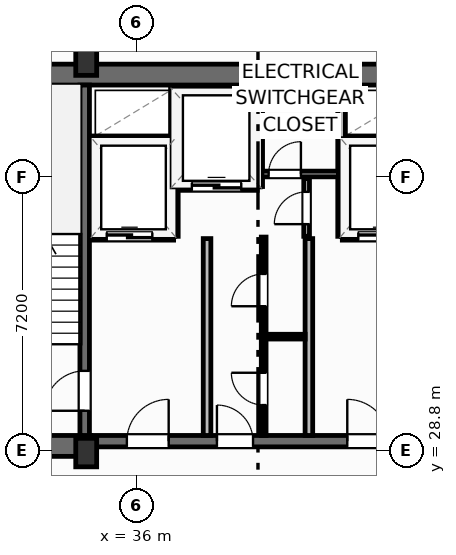
"""IFC4 building model, lengths in metres.
Left out: names, types, materials, properties, quantities, classifications, styles, units other than length and angle.
Written with IfcOpenShell. Run it as: python <this file> out.ifc"""

import sys

from ifc_helpers import new_model, si_unit, direction, frame, frame_2d, origin, origin_2d, place, context, subcontext, project, spatial, rectangle, extrude, element, fill, save


model = new_model("IFC4")
c1 = context("Model", 3, precision=1e-05, world=origin(), true_north=direction((0.0, 1.0)))
c2 = subcontext(c1, "Body", "Model", "MODEL_VIEW")
j1 = project(units=[si_unit("LENGTHUNIT", "METRE"), si_unit("PLANEANGLEUNIT", "RADIAN")], contexts=[c1])
p1 = place(None, origin())
s1 = spatial("IfcSite", under=j1, at=p1, CompositionType="ELEMENT")
p2 = place(p1, origin())
s2 = spatial("IfcBuilding", under=s1, at=p2, CompositionType="ELEMENT")
p3 = place(p2, frame((0.0, 0.0, 276.7)))
s3 = spatial("IfcBuildingStorey", under=s2, at=p3, CompositionType="ELEMENT", Elevation=276.7)
for number, where, z_axis, x_axis in (
    (1, (34.68, 28.75, 0.0), (0.0, 0.0, 1.0), (1.0, 0.0, 0.0)),
    (2, (34.68, 39.05, 0.0), (0.0, 0.0, 1.0), (1.0, 0.0, 0.0)),
):
    element("IfcColumn", number, at=place(p3, frame(where, z_axis=z_axis, x_axis=x_axis)), inside=s3, PredefinedType="COLUMN", context=c2, shape_type="SweptSolid", body=[
        extrude(rectangle(XDim=0.55, YDim=0.75, at=origin_2d()), origin(), (0.0, 0.0, 1.0), 3.7),
    ])
p4 = place(p3, frame((30.58, 38.695, 0.0), z_axis=(0.0, 0.0, 1.0), x_axis=(1.0, 0.0, 0.0)))
e3 = element("IfcWall", 3, at=p4, inside=s3, PredefinedType="SHEAR", context=c2, shape_type="SweptSolid", body=[
    extrude(rectangle(XDim=17.24, YDim=0.55, at=frame_2d((8.62, 0.0))), origin(), (0.0, 0.0, 1.0), 3.45),
])
p5 = place(p3, frame((30.58, 28.925, 0.0), z_axis=(0.0, 0.0, 1.0), x_axis=(1.0, 0.0, 0.0)))
e4 = element("IfcWall", 4, at=p5, inside=s3, PredefinedType="SHEAR", context=c2, shape_type="SweptSolid", body=[
    extrude(rectangle(XDim=4.22, YDim=0.55, at=frame_2d((2.11, 0.0))), origin(), (0.0, 0.0, 1.0), 3.45),
])
p6 = place(p3, frame((34.8, 29.05, 0.0), z_axis=(0.0, 0.0, 1.0), x_axis=(1.0, 0.0, 0.0)))
e5 = element("IfcWall", 5, at=p6, inside=s3, PredefinedType="SHEAR", context=c2, shape_type="SweptSolid", body=[
    extrude(rectangle(XDim=8.8, YDim=0.3, at=frame_2d((4.4, 0.0))), origin(), (0.0, 0.0, 1.0), 3.45),
])
p7 = place(p6, frame((0.95, 0.0, 0.0)))
e6 = element("IfcOpeningElement", 6, at=p7, cuts=e5, PredefinedType="OPENING", context=c2, shape_type="SweptSolid", body=[
    extrude(rectangle(XDim=1.1, YDim=2.15, at=frame_2d((0.55, 1.075))), frame((0.0, 0.16, 0.0), z_axis=(0.0, -1.0, 0.0), x_axis=(1.0, 0.0, 0.0)), (0.0, 0.0, 1.0), 0.32),
])
p8 = place(p6, frame((6.75, 0.0, 0.0)))
e7 = element("IfcOpeningElement", 7, at=p8, cuts=e5, PredefinedType="OPENING", context=c2, shape_type="SweptSolid", body=[
    extrude(rectangle(XDim=1.1, YDim=2.15, at=frame_2d((0.55, 1.075))), frame((0.0, 0.16, 0.0), z_axis=(0.0, -1.0, 0.0), x_axis=(1.0, 0.0, 0.0)), (0.0, 0.0, 1.0), 0.32),
])
p9 = place(p6, frame((3.32, 0.0, 0.0)))
e8 = element("IfcOpeningElement", 8, at=p9, cuts=e5, PredefinedType="OPENING", context=c2, shape_type="SweptSolid", body=[
    extrude(rectangle(XDim=0.95, YDim=2.15, at=frame_2d((0.475, 1.075))), frame((0.0, 0.16, 0.0), z_axis=(0.0, -1.0, 0.0), x_axis=(1.0, 0.0, 0.0)), (0.0, 0.0, 1.0), 0.32),
])
p10 = place(p3, frame((34.64, 29.2, 0.0), z_axis=(0.0, 0.0, 1.0), x_axis=(0.0, 1.0, 0.0)))
e9 = element("IfcWall", 9, at=p10, inside=s3, PredefinedType="SHEAR", context=c2, shape_type="SweptSolid", body=[
    extrude(rectangle(XDim=9.22, YDim=0.25, at=frame_2d((4.61, 0.0))), origin(), (0.0, 0.0, 1.0), 3.45),
])
p11 = place(p10, frame((0.65, 0.0, 0.0)))
e10 = element("IfcOpeningElement", 10, at=p11, cuts=e9, PredefinedType="OPENING", context=c2, shape_type="SweptSolid", body=[
    extrude(rectangle(XDim=1.05, YDim=2.15, at=frame_2d((0.525, 1.075))), frame((0.0, 0.135, 0.0), z_axis=(0.0, -1.0, 0.0), x_axis=(1.0, 0.0, 0.0)), (0.0, 0.0, 1.0), 0.27),
])
for number, where, z_axis, x_axis in (
    (11, (37.86, 29.2, 0.0), (0.0, 0.0, 1.0), (0.0, 1.0, 0.0)),
    (12, (40.54, 29.2, 0.0), (0.0, 0.0, 1.0), (0.0, 1.0, 0.0)),
):
    element("IfcWall", number, at=place(p3, frame(where, z_axis=z_axis, x_axis=x_axis)), inside=s3, PredefinedType="PARTITIONING", context=c2, shape_type="SweptSolid", body=[
        extrude(rectangle(XDim=5.18, YDim=0.2, at=frame_2d((2.59, 0.0))), origin(), (0.0, 0.0, 1.0), 3.45),
    ])
p12 = place(p3, frame((34.8, 34.44, 0.0), z_axis=(0.0, 0.0, 1.0), x_axis=(1.0, 0.0, 0.0)))
e13 = element("IfcWall", 13, at=p12, inside=s3, PredefinedType="PARTITIONING", context=c2, shape_type="SweptSolid", body=[
    extrude(rectangle(XDim=2.18, YDim=0.2, at=frame_2d((1.09, 0.0))), origin(), (0.0, 0.0, 1.0), 3.45),
])
p13 = place(p12, frame((0.42, 0.0, 0.0)))
e14 = element("IfcOpeningElement", 14, at=p13, cuts=e13, PredefinedType="OPENING", context=c2, shape_type="SweptSolid", body=[
    extrude(rectangle(XDim=1.2, YDim=2.2, at=frame_2d((0.6, 1.1))), frame((0.0, 0.11, 0.0), z_axis=(0.0, -1.0, 0.0), x_axis=(1.0, 0.0, 0.0)), (0.0, 0.0, 1.0), 0.22),
])
p14 = place(p3, frame((34.8, 36.98, 0.0), z_axis=(0.0, 0.0, 1.0), x_axis=(1.0, 0.0, 0.0)))
e15 = element("IfcWall", 15, at=p14, inside=s3, PredefinedType="PARTITIONING", context=c2, shape_type="SweptSolid", body=[
    extrude(rectangle(XDim=2.18, YDim=0.2, at=frame_2d((1.09, 0.0))), origin(), (0.0, 0.0, 1.0), 3.45),
])
p15 = place(p3, frame((37.0, 34.44, 0.0), z_axis=(0.0, 0.0, 1.0), x_axis=(0.0, 1.0, 0.0)))
e16 = element("IfcWall", 16, at=p15, inside=s3, PredefinedType="PARTITIONING", context=c2, shape_type="SweptSolid", body=[
    extrude(rectangle(XDim=3.9, YDim=0.2, at=frame_2d((1.95, 0.0))), origin(), (0.0, 0.0, 1.0), 3.45),
])
p16 = place(p3, frame((41.42, 34.44, 0.0), z_axis=(0.0, 0.0, 1.0), x_axis=(1.0, 0.0, 0.0)))
e17 = element("IfcWall", 17, at=p16, inside=s3, PredefinedType="PARTITIONING", context=c2, shape_type="SweptSolid", body=[
    extrude(rectangle(XDim=2.18, YDim=0.2, at=frame_2d((1.09, 0.0))), origin(), (0.0, 0.0, 1.0), 3.45),
])
p17 = place(p16, frame((0.42, 0.0, 0.0)))
e18 = element("IfcOpeningElement", 18, at=p17, cuts=e17, PredefinedType="OPENING", context=c2, shape_type="SweptSolid", body=[
    extrude(rectangle(XDim=1.2, YDim=2.2, at=frame_2d((0.6, 1.1))), frame((0.0, 0.11, 0.0), z_axis=(0.0, -1.0, 0.0), x_axis=(1.0, 0.0, 0.0)), (0.0, 0.0, 1.0), 0.22),
])
p18 = place(p3, frame((41.42, 36.98, 0.0), z_axis=(0.0, 0.0, 1.0), x_axis=(1.0, 0.0, 0.0)))
e19 = element("IfcWall", 19, at=p18, inside=s3, PredefinedType="PARTITIONING", context=c2, shape_type="SweptSolid", body=[
    extrude(rectangle(XDim=2.18, YDim=0.2, at=frame_2d((1.09, 0.0))), origin(), (0.0, 0.0, 1.0), 3.45),
])
p19 = place(p3, frame((41.4, 34.44, 0.0), z_axis=(0.0, 0.0, 1.0), x_axis=(0.0, 1.0, 0.0)))
e20 = element("IfcWall", 20, at=p19, inside=s3, PredefinedType="PARTITIONING", context=c2, shape_type="SweptSolid", body=[
    extrude(rectangle(XDim=3.9, YDim=0.2, at=frame_2d((1.95, 0.0))), origin(), (0.0, 0.0, 1.0), 3.45),
])
p20 = place(p3, frame((37.06, 35.75, 0.0), z_axis=(0.0, 0.0, 1.0), x_axis=(1.0, 0.0, 0.0)))
e21 = element("IfcWall", 21, at=p20, inside=s3, PredefinedType="PARTITIONING", context=c2, shape_type="SweptSolid", body=[
    extrude(rectangle(XDim=2.12, YDim=0.2, at=frame_2d((1.06, 0.0))), origin(), (0.0, 0.0, 1.0), 3.45),
])
p21 = place(p20, frame((0.4, 0.0, 0.0)))
e22 = element("IfcOpeningElement", 22, at=p21, cuts=e21, PredefinedType="OPENING", context=c2, shape_type="SweptSolid", body=[
    extrude(rectangle(XDim=1.3, YDim=2.2, at=frame_2d((0.65, 1.1))), frame((0.0, 0.11, 0.0), z_axis=(0.0, -1.0, 0.0), x_axis=(1.0, 0.0, 0.0)), (0.0, 0.0, 1.0), 0.22),
])
p22 = place(p3, frame((39.22, 35.75, 0.0), z_axis=(0.0, 0.0, 1.0), x_axis=(0.0, 1.0, 0.0)))
e23 = element("IfcWall", 23, at=p22, inside=s3, PredefinedType="PARTITIONING", context=c2, shape_type="SweptSolid", body=[
    extrude(rectangle(XDim=2.59, YDim=0.2, at=frame_2d((1.295, 0.0))), origin(), (0.0, 0.0, 1.0), 3.45),
])
p23 = place(p3, frame((39.3, 36.08, 0.0), z_axis=(0.0, 0.0, 1.0), x_axis=(1.0, 0.0, 0.0)))
e24 = element("IfcWall", 24, at=p23, inside=s3, PredefinedType="PARTITIONING", context=c2, shape_type="SweptSolid", body=[
    extrude(rectangle(XDim=2.02, YDim=0.15, at=frame_2d((1.01, 0.0))), origin(), (0.0, 0.0, 1.0), 3.45),
])
p24 = place(p23, frame((0.18, 0.0, 0.0)))
e25 = element("IfcOpeningElement", 25, at=p24, cuts=e24, PredefinedType="OPENING", context=c2, shape_type="SweptSolid", body=[
    extrude(rectangle(XDim=0.85, YDim=2.05, at=frame_2d((0.425, 1.025))), frame((0.0, 0.085, 0.0), z_axis=(0.0, -1.0, 0.0), x_axis=(1.0, 0.0, 0.0)), (0.0, 0.0, 1.0), 0.17),
])
p25 = place(p3, frame((40.48, 34.44, 0.0), z_axis=(0.0, 0.0, 1.0), x_axis=(0.0, 1.0, 0.0)))
e26 = element("IfcWall", 26, at=p25, inside=s3, PredefinedType="PARTITIONING", context=c2, shape_type="SweptSolid", body=[
    extrude(rectangle(XDim=1.52, YDim=0.15, at=frame_2d((0.76, 0.0))), origin(), (0.0, 0.0, 1.0), 3.45),
])
p26 = place(p25, frame((0.32, 0.0, 0.0)))
e27 = element("IfcOpeningElement", 27, at=p26, cuts=e26, PredefinedType="OPENING", context=c2, shape_type="SweptSolid", body=[
    extrude(rectangle(XDim=0.85, YDim=2.05, at=frame_2d((0.425, 1.025))), frame((0.0, 0.085, 0.0), z_axis=(0.0, -1.0, 0.0), x_axis=(1.0, 0.0, 0.0)), (0.0, 0.0, 1.0), 0.17),
])
p27 = place(p3, frame((39.35, 31.8, 0.0), z_axis=(0.0, 0.0, 1.0), x_axis=(1.0, 0.0, 0.0)))
e28 = element("IfcWall", 28, at=p27, inside=s3, PredefinedType="PARTITIONING", context=c2, shape_type="SweptSolid", body=[
    extrude(rectangle(XDim=1.09, YDim=0.125, at=frame_2d((0.545, 0.0))), origin(), (0.0, 0.0, 1.0), 3.45),
])
p28 = place(p3, frame((39.35, 29.2, 0.0), z_axis=(0.0, 0.0, 1.0), x_axis=(0.0, 1.0, 0.0)))
e29 = element("IfcWall", 29, at=p28, inside=s3, PredefinedType="PARTITIONING", context=c2, shape_type="SweptSolid", body=[
    extrude(rectangle(XDim=5.22, YDim=0.125, at=frame_2d((2.61, 0.0))), origin(), (0.0, 0.0, 1.0), 3.45),
])
p29 = place(p28, frame((0.8, 0.0, 0.0)))
e30 = element("IfcOpeningElement", 30, at=p29, cuts=e29, PredefinedType="OPENING", context=c2, shape_type="SweptSolid", body=[
    extrude(rectangle(XDim=0.85, YDim=2.05, at=frame_2d((0.425, 1.025))), frame((0.0, 0.073, 0.0), z_axis=(0.0, -1.0, 0.0), x_axis=(1.0, 0.0, 0.0)), (0.0, 0.0, 1.0), 0.145),
])
p30 = place(p28, frame((3.4, 0.0, 0.0)))
e31 = element("IfcOpeningElement", 31, at=p30, cuts=e29, PredefinedType="OPENING", context=c2, shape_type="SweptSolid", body=[
    extrude(rectangle(XDim=0.85, YDim=2.05, at=frame_2d((0.425, 1.025))), frame((0.0, 0.073, 0.0), z_axis=(0.0, -1.0, 0.0), x_axis=(1.0, 0.0, 0.0)), (0.0, 0.0, 1.0), 0.145),
])
p31 = place(p11, origin())
e32 = element("IfcDoor", 32, at=p31, inside=s3, OperationType="SINGLE_SWING_LEFT", PredefinedType="DOOR", context=c2, shape_type="SweptSolid", body=[
    extrude(rectangle(XDim=1.05, YDim=2.15, at=frame_2d((0.525, 1.075))), frame((0.0, 0.025, 0.0), z_axis=(0.0, -1.0, 0.0), x_axis=(1.0, 0.0, 0.0)), (0.0, 0.0, 1.0), 0.05),
])
fill(e10, e32)
p32 = place(p7, origin())
e33 = element("IfcDoor", 33, at=p32, inside=s3, OperationType="SINGLE_SWING_RIGHT", PredefinedType="DOOR", context=c2, shape_type="SweptSolid", body=[
    extrude(rectangle(XDim=1.1, YDim=2.15, at=frame_2d((0.55, 1.075))), frame((0.0, 0.025, 0.0), z_axis=(0.0, -1.0, 0.0), x_axis=(1.0, 0.0, 0.0)), (0.0, 0.0, 1.0), 0.05),
])
fill(e6, e33)
p33 = place(p8, origin())
e34 = element("IfcDoor", 34, at=p33, inside=s3, OperationType="SINGLE_SWING_LEFT", PredefinedType="DOOR", context=c2, shape_type="SweptSolid", body=[
    extrude(rectangle(XDim=1.1, YDim=2.15, at=frame_2d((0.55, 1.075))), frame((0.0, 0.025, 0.0), z_axis=(0.0, -1.0, 0.0), x_axis=(1.0, 0.0, 0.0)), (0.0, 0.0, 1.0), 0.05),
])
fill(e7, e34)
p34 = place(p13, origin())
e35 = element("IfcDoor", 35, at=p34, inside=s3, OperationType="SLIDING_TO_LEFT", PredefinedType="DOOR", context=c2, shape_type="SweptSolid", body=[
    extrude(rectangle(XDim=1.2, YDim=2.2, at=frame_2d((0.6, 1.1))), frame((0.0, 0.025, 0.0), z_axis=(0.0, -1.0, 0.0), x_axis=(1.0, 0.0, 0.0)), (0.0, 0.0, 1.0), 0.05),
])
fill(e14, e35)
p35 = place(p17, origin())
e36 = element("IfcDoor", 36, at=p35, inside=s3, OperationType="SLIDING_TO_LEFT", PredefinedType="DOOR", context=c2, shape_type="SweptSolid", body=[
    extrude(rectangle(XDim=1.2, YDim=2.2, at=frame_2d((0.6, 1.1))), frame((0.0, 0.025, 0.0), z_axis=(0.0, -1.0, 0.0), x_axis=(1.0, 0.0, 0.0)), (0.0, 0.0, 1.0), 0.05),
])
fill(e18, e36)
p36 = place(p21, origin())
e37 = element("IfcDoor", 37, at=p36, inside=s3, OperationType="SLIDING_TO_LEFT", PredefinedType="DOOR", context=c2, shape_type="SweptSolid", body=[
    extrude(rectangle(XDim=1.3, YDim=2.2, at=frame_2d((0.65, 1.1))), frame((0.0, 0.025, 0.0), z_axis=(0.0, -1.0, 0.0), x_axis=(1.0, 0.0, 0.0)), (0.0, 0.0, 1.0), 0.05),
])
fill(e22, e37)
p37 = place(p24, origin())
e38 = element("IfcDoor", 38, at=p37, inside=s3, OperationType="SINGLE_SWING_RIGHT", PredefinedType="DOOR", context=c2, shape_type="SweptSolid", body=[
    extrude(rectangle(XDim=0.85, YDim=2.05, at=frame_2d((0.425, 1.025))), frame((0.0, 0.025, 0.0), z_axis=(0.0, -1.0, 0.0), x_axis=(1.0, 0.0, 0.0)), (0.0, 0.0, 1.0), 0.05),
])
fill(e25, e38)
p38 = place(p26, origin())
e39 = element("IfcDoor", 39, at=p38, inside=s3, OperationType="SINGLE_SWING_LEFT", PredefinedType="DOOR", context=c2, shape_type="SweptSolid", body=[
    extrude(rectangle(XDim=0.85, YDim=2.05, at=frame_2d((0.425, 1.025))), frame((0.0, 0.025, 0.0), z_axis=(0.0, -1.0, 0.0), x_axis=(1.0, 0.0, 0.0)), (0.0, 0.0, 1.0), 0.05),
])
fill(e27, e39)
p39 = place(p29, origin())
e40 = element("IfcDoor", 40, at=p39, inside=s3, OperationType="SINGLE_SWING_RIGHT", PredefinedType="DOOR", context=c2, shape_type="SweptSolid", body=[
    extrude(rectangle(XDim=0.85, YDim=2.05, at=frame_2d((0.425, 1.025))), frame((0.0, 0.025, 0.0), z_axis=(0.0, -1.0, 0.0), x_axis=(1.0, 0.0, 0.0)), (0.0, 0.0, 1.0), 0.05),
])
fill(e30, e40)
p40 = place(p30, origin())
e41 = element("IfcDoor", 41, at=p40, inside=s3, OperationType="SINGLE_SWING_LEFT", PredefinedType="DOOR", context=c2, shape_type="SweptSolid", body=[
    extrude(rectangle(XDim=0.85, YDim=2.05, at=frame_2d((0.425, 1.025))), frame((0.0, 0.025, 0.0), z_axis=(0.0, -1.0, 0.0), x_axis=(1.0, 0.0, 0.0)), (0.0, 0.0, 1.0), 0.05),
])
fill(e31, e41)
p41 = place(p9, origin())
e42 = element("IfcDoor", 42, at=p41, inside=s3, OperationType="SINGLE_SWING_LEFT", PredefinedType="DOOR", context=c2, shape_type="SweptSolid", body=[
    extrude(rectangle(XDim=0.95, YDim=2.15, at=frame_2d((0.475, 1.075))), frame((0.0, 0.025, 0.0), z_axis=(0.0, -1.0, 0.0), x_axis=(1.0, 0.0, 0.0)), (0.0, 0.0, 1.0), 0.05),
])
fill(e8, e42)
save(model, sys.argv[1])
